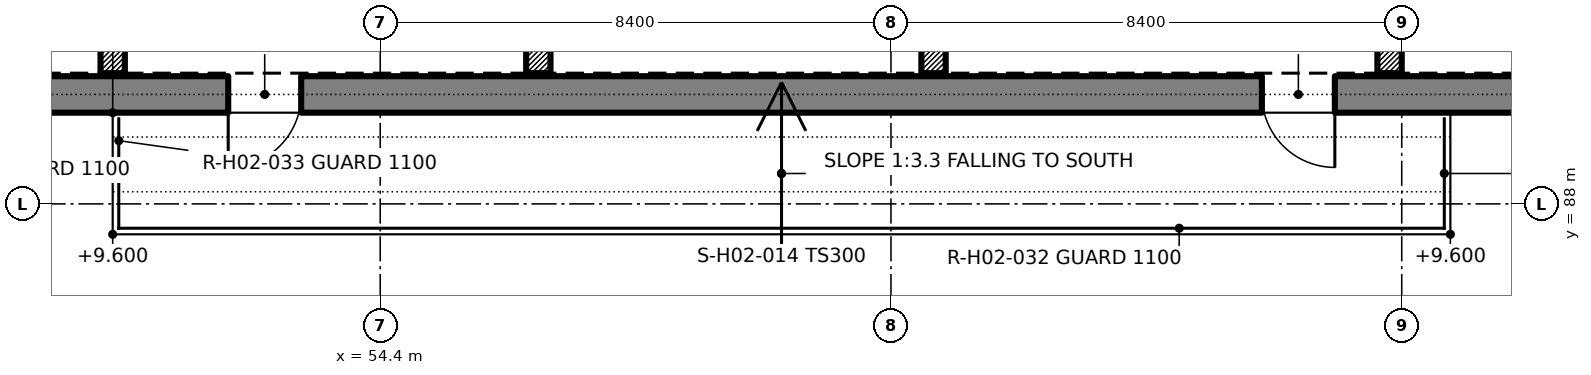
"""IFC4 building model, lengths in metres.
Left out: names, types, materials, properties, quantities, classifications, styles, units other than length and angle.
Written with IfcOpenShell. Run it as: python <this file> out.ifc"""

import sys

from ifc_helpers import new_model, si_unit, direction, frame, frame_2d, origin, origin_2d, place, context, subcontext, project, spatial, rectangle, extrude, element, fill, save


model = new_model("IFC4")
c1 = context("Model", 3, precision=1e-05, world=origin(), true_north=direction((0.0, 1.0)))
c2 = subcontext(c1, "Body", "Model", "MODEL_VIEW")
j1 = project(units=[si_unit("LENGTHUNIT", "METRE"), si_unit("PLANEANGLEUNIT", "RADIAN")], contexts=[c1])
p1 = place(None, origin())
s1 = spatial("IfcSite", under=j1, at=p1, CompositionType="ELEMENT")
p2 = place(p1, origin())
s2 = spatial("IfcBuilding", under=s1, at=p2, CompositionType="ELEMENT")
p3 = place(p2, frame((0.0, 0.0, 10.2)))
s3 = spatial("IfcBuildingStorey", under=s2, at=p3, CompositionType="ELEMENT", Elevation=10.2)
p4 = place(p3, frame((36.5, 89.8, 0.0), z_axis=(0.0, 0.0, 1.0), x_axis=(1.0, 0.0, 0.0)))
e1 = element("IfcWall", 1, at=p4, inside=s3, PredefinedType="SOLIDWALL", context=c2, shape_type="SweptSolid", body=[
    extrude(rectangle(XDim=52.6, YDim=0.6, at=frame_2d((26.3, 0.0))), origin(), (0.0, 0.0, 1.0), 4.8),
])
p5 = place(p4, frame((7.9, 0.0, 0.0)))
e2 = element("IfcOpeningElement", 2, at=p5, cuts=e1, PredefinedType="OPENING", context=c2, shape_type="SweptSolid", body=[
    extrude(rectangle(XDim=1.2, YDim=2.1, at=frame_2d((0.6, 1.05))), frame((0.0, 0.31, 0.0), z_axis=(0.0, -1.0, 0.0), x_axis=(1.0, 0.0, 0.0)), (0.0, 0.0, 1.0), 0.62),
])
p6 = place(p4, frame((15.4, 0.0, 0.0)))
e3 = element("IfcOpeningElement", 3, at=p6, cuts=e1, PredefinedType="OPENING", context=c2, shape_type="SweptSolid", body=[
    extrude(rectangle(XDim=1.2, YDim=2.1, at=frame_2d((0.6, 1.05))), frame((0.0, 0.31, 0.0), z_axis=(0.0, -1.0, 0.0), x_axis=(1.0, 0.0, 0.0)), (0.0, 0.0, 1.0), 0.62),
])
p7 = place(p4, frame((32.4, 0.0, 0.0)))
e4 = element("IfcOpeningElement", 4, at=p7, cuts=e1, PredefinedType="OPENING", context=c2, shape_type="SweptSolid", body=[
    extrude(rectangle(XDim=1.2, YDim=2.1, at=frame_2d((0.6, 1.05))), frame((0.0, 0.31, 0.0), z_axis=(0.0, -1.0, 0.0), x_axis=(1.0, 0.0, 0.0)), (0.0, 0.0, 1.0), 0.62),
])
for number, where, z_axis, x_axis in (
    (5, (50.0, 90.35, 0.0), (0.0, 0.0, 1.0), (1.0, 0.0, 0.0)),
    (6, (57.0, 90.35, 0.0), (0.0, 0.0, 1.0), (1.0, 0.0, 0.0)),
    (7, (63.5, 90.35, 0.0), (0.0, 0.0, 1.0), (1.0, 0.0, 0.0)),
    (8, (71.0, 90.35, 0.0), (0.0, 0.0, 1.0), (1.0, 0.0, 0.0)),
):
    element("IfcColumn", number, at=place(p3, frame(where, z_axis=z_axis, x_axis=x_axis)), inside=s3, PredefinedType="COLUMN", context=c2, shape_type="SweptSolid", body=[
        extrude(rectangle(XDim=0.4, YDim=0.4, at=origin_2d()), origin(), (0.0, 0.0, 1.0), 4.8),
    ])
p8 = place(p6, frame((1.2, 0.0, 0.0), z_axis=(0.0, 0.0, 1.0), x_axis=(-1.0, 0.0, 0.0)))
e9 = element("IfcDoor", 9, at=p8, inside=s3, OperationType="SINGLE_SWING_RIGHT", PredefinedType="DOOR", context=c2, shape_type="SweptSolid", body=[
    extrude(rectangle(XDim=1.2, YDim=2.1, at=frame_2d((0.6, 1.05))), frame((0.0, 0.025, 0.0), z_axis=(0.0, -1.0, 0.0), x_axis=(1.0, 0.0, 0.0)), (0.0, 0.0, 1.0), 0.05),
])
fill(e3, e9)
p9 = place(p7, frame((1.2, 0.0, 0.0), z_axis=(0.0, 0.0, 1.0), x_axis=(-1.0, 0.0, 0.0)))
e10 = element("IfcDoor", 10, at=p9, inside=s3, OperationType="SINGLE_SWING_LEFT", PredefinedType="DOOR", context=c2, shape_type="SweptSolid", body=[
    extrude(rectangle(XDim=1.2, YDim=2.1, at=frame_2d((0.6, 1.05))), frame((0.0, 0.025, 0.0), z_axis=(0.0, -1.0, 0.0), x_axis=(1.0, 0.0, 0.0)), (0.0, 0.0, 1.0), 0.05),
])
fill(e4, e10)
save(model, sys.argv[1])
